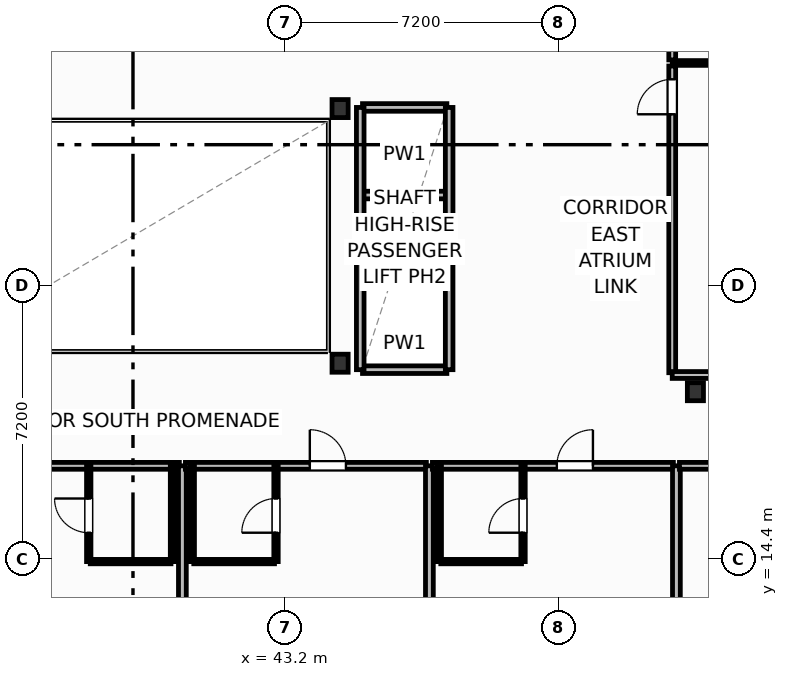
"""IFC4 building model, lengths in metres.
Left out: names, types, materials, properties, quantities, classifications, styles, units other than length and angle.
Written with IfcOpenShell. Run it as: python <this file> out.ifc"""

import sys

from ifc_helpers import new_model, si_unit, direction, frame, frame_2d, origin, origin_2d, place, context, subcontext, project, spatial, rectangle, i_section, extrude, element, fill, save


model = new_model("IFC4")
c1 = context("Model", 3, precision=1e-05, world=origin(), true_north=direction((0.0, 1.0)))
c2 = subcontext(c1, "Body", "Model", "MODEL_VIEW")
j1 = project(units=[si_unit("LENGTHUNIT", "METRE"), si_unit("PLANEANGLEUNIT", "RADIAN")], contexts=[c1])
p1 = place(None, origin())
s1 = spatial("IfcSite", under=j1, at=p1, CompositionType="ELEMENT")
p2 = place(p1, origin())
s2 = spatial("IfcBuilding", under=s1, at=p2, CompositionType="ELEMENT")
p3 = place(p2, frame((0.0, 0.0, 125.4)))
s3 = spatial("IfcBuildingStorey", under=s2, at=p3, CompositionType="ELEMENT", Elevation=125.4)
for number, where, z_axis, x_axis in (
    (1, (44.65, 19.55, 0.0), (0.0, 0.0, 1.0), (1.0, 0.0, 0.0)),
    (2, (44.65, 26.25, 0.0), (0.0, 0.0, 1.0), (1.0, 0.0, 0.0)),
    (3, (54.0, 18.8, 0.0), (0.0, 0.0, 1.0), (1.0, 0.0, 0.0)),
):
    element("IfcColumn", number, at=place(p3, frame(where, z_axis=z_axis, x_axis=x_axis)), inside=s3, PredefinedType="COLUMN", context=c2, shape_type="SweptSolid", body=[
        extrude(i_section(OverallWidth=0.424, OverallDepth=0.474, WebThickness=0.048, FlangeThickness=0.077, FilletRadius=0.025, at=origin_2d()), origin(), (0.0, 0.0, 1.0), 3.7),
    ])
p4 = place(p3, frame((34.08, 16.85, 0.0), z_axis=(0.0, 0.0, 1.0), x_axis=(1.0, 0.0, 0.0)))
e4 = element("IfcWall", 4, at=p4, inside=s3, PredefinedType="PARTITIONING", context=c2, shape_type="SweptSolid", body=[
    extrude(rectangle(XDim=6.34, YDim=0.18, at=frame_2d((3.17, 0.0))), origin(), (0.0, 0.0, 1.0), 3.45),
])
p5 = place(p4, frame((0.91, 0.0, 0.0)))
e5 = element("IfcOpeningElement", 5, at=p5, cuts=e4, PredefinedType="OPENING", context=c2, shape_type="SweptSolid", body=[
    extrude(rectangle(XDim=0.95, YDim=2.15, at=frame_2d((0.475, 1.075))), frame((0.0, 0.1, 0.0), z_axis=(0.0, -1.0, 0.0), x_axis=(1.0, 0.0, 0.0)), (0.0, 0.0, 1.0), 0.2),
])
p6 = place(p3, frame((38.076, 14.33, 0.0), z_axis=(0.0, 0.0, 1.0), x_axis=(1.0, 0.0, 0.0)))
e6 = element("IfcWall", 6, at=p6, inside=s3, PredefinedType="PARTITIONING", context=c2, shape_type="SweptSolid", body=[
    extrude(rectangle(XDim=2.124, YDim=0.115, at=frame_2d((1.062, 0.0))), origin(), (0.0, 0.0, 1.0), 3.45),
])
p7 = place(p3, frame((38.036, 14.33, 0.0), z_axis=(0.0, 0.0, 1.0), x_axis=(0.0, 1.0, 0.0)))
e7 = element("IfcWall", 7, at=p7, inside=s3, PredefinedType="PARTITIONING", context=c2, shape_type="SweptSolid", body=[
    extrude(rectangle(XDim=2.52, YDim=0.115, at=frame_2d((1.26, 0.0))), origin(), (0.0, 0.0, 1.0), 3.45),
])
p8 = place(p7, frame((0.76, 0.0, 0.0)))
e8 = element("IfcOpeningElement", 8, at=p8, cuts=e7, PredefinedType="OPENING", context=c2, shape_type="SweptSolid", body=[
    extrude(rectangle(XDim=0.9, YDim=2.05, at=frame_2d((0.45, 1.025))), frame((0.0, 0.067, 0.0), z_axis=(0.0, -1.0, 0.0), x_axis=(1.0, 0.0, 0.0)), (0.0, 0.0, 1.0), 0.135),
])
p9 = place(p3, frame((40.24, 14.33, 0.0), z_axis=(0.0, 0.0, 1.0), x_axis=(0.0, 1.0, 0.0)))
e9 = element("IfcWall", 9, at=p9, inside=s3, PredefinedType="PARTITIONING", context=c2, shape_type="SweptSolid", body=[
    extrude(rectangle(XDim=2.52, YDim=0.115, at=frame_2d((1.26, 0.0))), origin(), (0.0, 0.0, 1.0), 3.45),
])
p10 = place(p3, frame((40.5, 3.077, 0.0), z_axis=(0.0, 0.0, 1.0), x_axis=(0.0, 1.0, 0.0)))
e10 = element("IfcWall", 10, at=p10, inside=s3, PredefinedType="PARTITIONING", context=c2, shape_type="SweptSolid", body=[
    extrude(rectangle(XDim=13.773, YDim=0.205, at=frame_2d((6.887, 0.0))), origin(), (0.0, 0.0, 1.0), 3.45),
])
p11 = place(p3, frame((40.58, 16.85, 0.0), z_axis=(0.0, 0.0, 1.0), x_axis=(1.0, 0.0, 0.0)))
e11 = element("IfcWall", 11, at=p11, inside=s3, PredefinedType="PARTITIONING", context=c2, shape_type="SweptSolid", body=[
    extrude(rectangle(XDim=6.34, YDim=0.18, at=frame_2d((3.17, 0.0))), origin(), (0.0, 0.0, 1.0), 3.45),
])
p12 = place(p11, frame((3.274, 0.0, 0.0)))
e12 = element("IfcOpeningElement", 12, at=p12, cuts=e11, PredefinedType="OPENING", context=c2, shape_type="SweptSolid", body=[
    extrude(rectangle(XDim=0.95, YDim=2.15, at=frame_2d((0.475, 1.075))), frame((0.0, 0.1, 0.0), z_axis=(0.0, -1.0, 0.0), x_axis=(1.0, 0.0, 0.0)), (0.0, 0.0, 1.0), 0.2),
])
p13 = place(p3, frame((40.8, 14.33, 0.0), z_axis=(0.0, 0.0, 1.0), x_axis=(1.0, 0.0, 0.0)))
e13 = element("IfcWall", 13, at=p13, inside=s3, PredefinedType="PARTITIONING", context=c2, shape_type="SweptSolid", body=[
    extrude(rectangle(XDim=2.124, YDim=0.115, at=frame_2d((1.062, 0.0))), origin(), (0.0, 0.0, 1.0), 3.45),
])
p14 = place(p3, frame((42.964, 14.33, 0.0), z_axis=(0.0, 0.0, 1.0), x_axis=(0.0, 1.0, 0.0)))
e14 = element("IfcWall", 14, at=p14, inside=s3, PredefinedType="PARTITIONING", context=c2, shape_type="SweptSolid", body=[
    extrude(rectangle(XDim=2.52, YDim=0.115, at=frame_2d((1.26, 0.0))), origin(), (0.0, 0.0, 1.0), 3.45),
])
p15 = place(p14, frame((0.76, 0.0, 0.0)))
e15 = element("IfcOpeningElement", 15, at=p15, cuts=e14, PredefinedType="OPENING", context=c2, shape_type="SweptSolid", body=[
    extrude(rectangle(XDim=0.9, YDim=2.05, at=frame_2d((0.45, 1.025))), frame((0.0, 0.067, 0.0), z_axis=(0.0, -1.0, 0.0), x_axis=(1.0, 0.0, 0.0)), (0.0, 0.0, 1.0), 0.135),
])
p16 = place(p3, frame((40.76, 14.33, 0.0), z_axis=(0.0, 0.0, 1.0), x_axis=(0.0, 1.0, 0.0)))
e16 = element("IfcWall", 16, at=p16, inside=s3, PredefinedType="PARTITIONING", context=c2, shape_type="SweptSolid", body=[
    extrude(rectangle(XDim=2.52, YDim=0.115, at=frame_2d((1.26, 0.0))), origin(), (0.0, 0.0, 1.0), 3.45),
])
p17 = place(p3, frame((47.0, 3.019, 0.0), z_axis=(0.0, 0.0, 1.0), x_axis=(0.0, 1.0, 0.0)))
e17 = element("IfcWall", 17, at=p17, inside=s3, PredefinedType="PARTITIONING", context=c2, shape_type="SweptSolid", body=[
    extrude(rectangle(XDim=13.831, YDim=0.205, at=frame_2d((6.916, 0.0))), origin(), (0.0, 0.0, 1.0), 3.45),
])
p18 = place(p3, frame((47.08, 16.85, 0.0), z_axis=(0.0, 0.0, 1.0), x_axis=(1.0, 0.0, 0.0)))
e18 = element("IfcWall", 18, at=p18, inside=s3, PredefinedType="PARTITIONING", context=c2, shape_type="SweptSolid", body=[
    extrude(rectangle(XDim=6.34, YDim=0.18, at=frame_2d((3.17, 0.0))), origin(), (0.0, 0.0, 1.0), 3.45),
])
p19 = place(p18, frame((3.274, 0.0, 0.0)))
e19 = element("IfcOpeningElement", 19, at=p19, cuts=e18, PredefinedType="OPENING", context=c2, shape_type="SweptSolid", body=[
    extrude(rectangle(XDim=0.95, YDim=2.15, at=frame_2d((0.475, 1.075))), frame((0.0, 0.1, 0.0), z_axis=(0.0, -1.0, 0.0), x_axis=(1.0, 0.0, 0.0)), (0.0, 0.0, 1.0), 0.2),
])
p20 = place(p3, frame((47.3, 14.33, 0.0), z_axis=(0.0, 0.0, 1.0), x_axis=(1.0, 0.0, 0.0)))
e20 = element("IfcWall", 20, at=p20, inside=s3, PredefinedType="PARTITIONING", context=c2, shape_type="SweptSolid", body=[
    extrude(rectangle(XDim=2.124, YDim=0.115, at=frame_2d((1.062, 0.0))), origin(), (0.0, 0.0, 1.0), 3.45),
])
p21 = place(p3, frame((49.464, 14.33, 0.0), z_axis=(0.0, 0.0, 1.0), x_axis=(0.0, 1.0, 0.0)))
e21 = element("IfcWall", 21, at=p21, inside=s3, PredefinedType="PARTITIONING", context=c2, shape_type="SweptSolid", body=[
    extrude(rectangle(XDim=2.52, YDim=0.115, at=frame_2d((1.26, 0.0))), origin(), (0.0, 0.0, 1.0), 3.45),
])
p22 = place(p21, frame((0.76, 0.0, 0.0)))
e22 = element("IfcOpeningElement", 22, at=p22, cuts=e21, PredefinedType="OPENING", context=c2, shape_type="SweptSolid", body=[
    extrude(rectangle(XDim=0.9, YDim=2.05, at=frame_2d((0.45, 1.025))), frame((0.0, 0.067, 0.0), z_axis=(0.0, -1.0, 0.0), x_axis=(1.0, 0.0, 0.0)), (0.0, 0.0, 1.0), 0.135),
])
p23 = place(p3, frame((47.26, 14.33, 0.0), z_axis=(0.0, 0.0, 1.0), x_axis=(0.0, 1.0, 0.0)))
e23 = element("IfcWall", 23, at=p23, inside=s3, PredefinedType="PARTITIONING", context=c2, shape_type="SweptSolid", body=[
    extrude(rectangle(XDim=2.52, YDim=0.115, at=frame_2d((1.26, 0.0))), origin(), (0.0, 0.0, 1.0), 3.45),
])
p24 = place(p3, frame((53.5, 0.136, 0.0), z_axis=(0.0, 0.0, 1.0), x_axis=(0.0, 1.0, 0.0)))
e24 = element("IfcWall", 24, at=p24, inside=s3, PredefinedType="PARTITIONING", context=c2, shape_type="SweptSolid", body=[
    extrude(rectangle(XDim=16.714, YDim=0.205, at=frame_2d((8.357, 0.0))), origin(), (0.0, 0.0, 1.0), 3.45),
])
p25 = place(p3, frame((53.58, 16.85, 0.0), z_axis=(0.0, 0.0, 1.0), x_axis=(1.0, 0.0, 0.0)))
e25 = element("IfcWall", 25, at=p25, inside=s3, PredefinedType="PARTITIONING", context=c2, shape_type="SweptSolid", body=[
    extrude(rectangle(XDim=6.34, YDim=0.18, at=frame_2d((3.17, 0.0))), origin(), (0.0, 0.0, 1.0), 3.45),
])
p26 = place(p25, frame((0.91, 0.0, 0.0)))
e26 = element("IfcOpeningElement", 26, at=p26, cuts=e25, PredefinedType="OPENING", context=c2, shape_type="SweptSolid", body=[
    extrude(rectangle(XDim=0.95, YDim=2.15, at=frame_2d((0.475, 1.075))), frame((0.0, 0.1, 0.0), z_axis=(0.0, -1.0, 0.0), x_axis=(1.0, 0.0, 0.0)), (0.0, 0.0, 1.0), 0.2),
])
p27 = place(p3, frame((53.39, 19.3, 0.0), z_axis=(0.0, 0.0, 1.0), x_axis=(0.0, 1.0, 0.0)))
e27 = element("IfcWall", 27, at=p27, inside=s3, PredefinedType="PARTITIONING", context=c2, shape_type="SweptSolid", body=[
    extrude(rectangle(XDim=8.07, YDim=0.18, at=frame_2d((4.035, 0.0))), origin(), (0.0, 0.0, 1.0), 3.45),
])
p28 = place(p27, frame((6.8, 0.0, 0.0)))
e28 = element("IfcOpeningElement", 28, at=p28, cuts=e27, PredefinedType="OPENING", context=c2, shape_type="SweptSolid", body=[
    extrude(rectangle(XDim=0.92, YDim=2.05, at=frame_2d((0.46, 1.025))), frame((0.0, 0.1, 0.0), z_axis=(0.0, -1.0, 0.0), x_axis=(1.0, 0.0, 0.0)), (0.0, 0.0, 1.0), 0.2),
])
p29 = place(p3, frame((53.39, 27.53, 0.0), z_axis=(0.0, 0.0, 1.0), x_axis=(0.0, 1.0, 0.0)))
e29 = element("IfcWall", 29, at=p29, inside=s3, PredefinedType="PARTITIONING", context=c2, shape_type="SweptSolid", body=[
    extrude(rectangle(XDim=11.67, YDim=0.18, at=frame_2d((5.835, 0.0))), origin(), (0.0, 0.0, 1.0), 3.45),
])
p30 = place(p29, frame((5.8, 0.0, 0.0)))
e30 = element("IfcOpeningElement", 30, at=p30, cuts=e29, PredefinedType="OPENING", context=c2, shape_type="SweptSolid", body=[
    extrude(rectangle(XDim=0.92, YDim=2.05, at=frame_2d((0.46, 1.025))), frame((0.0, 0.1, 0.0), z_axis=(0.0, -1.0, 0.0), x_axis=(1.0, 0.0, 0.0)), (0.0, 0.0, 1.0), 0.2),
])
p31 = place(p3, frame((53.39, 27.45, 0.0), z_axis=(0.0, 0.0, 1.0), x_axis=(1.0, 0.0, 0.0)))
e31 = element("IfcWall", 31, at=p31, inside=s3, PredefinedType="PARTITIONING", context=c2, shape_type="SweptSolid", body=[
    extrude(rectangle(XDim=23.362, YDim=0.125, at=frame_2d((11.681, 0.0))), origin(), (0.0, 0.0, 1.0), 3.45),
])
p32 = place(p3, frame((53.39, 19.24, 0.0), z_axis=(0.0, 0.0, 1.0), x_axis=(1.0, 0.0, 0.0)))
e32 = element("IfcWall", 32, at=p32, inside=s3, PredefinedType="PARTITIONING", context=c2, shape_type="SweptSolid", body=[
    extrude(rectangle(XDim=22.367, YDim=0.18, at=frame_2d((11.183, 0.0))), origin(), (0.0, 0.0, 1.0), 2.662),
])
for number, where, z_axis, x_axis in (
    (33, (45.24, 21.675, 0.0), (0.0, 0.0, 1.0), (1.0, 0.0, 0.0)),
    (34, (45.24, 23.975, 0.0), (0.0, 0.0, 1.0), (1.0, 0.0, 0.0)),
):
    element("IfcWall", number, at=place(p3, frame(where, z_axis=z_axis, x_axis=x_axis)), inside=s3, PredefinedType="PARTITIONING", context=c2, shape_type="SweptSolid", body=[
        extrude(rectangle(XDim=2.22, YDim=0.2, at=frame_2d((1.11, 0.0))), origin(), (0.0, 0.0, 1.0), 3.45),
    ])
p33 = place(p3, frame((45.24, 19.38, 0.0), z_axis=(0.0, 0.0, 1.0), x_axis=(1.0, 0.0, 0.0)))
e35 = element("IfcWall", 35, at=p33, inside=s3, PredefinedType="PARTITIONING", context=c2, shape_type="SweptSolid", body=[
    extrude(rectangle(XDim=2.22, YDim=0.2, at=frame_2d((1.11, 0.0))), origin(), (0.0, 0.0, 1.0), 2.662),
])
p34 = place(p3, frame((45.24, 26.28, 0.0), z_axis=(0.0, 0.0, 1.0), x_axis=(1.0, 0.0, 0.0)))
e36 = element("IfcWall", 36, at=p34, inside=s3, PredefinedType="PARTITIONING", context=c2, shape_type="SweptSolid", body=[
    extrude(rectangle(XDim=2.22, YDim=0.2, at=frame_2d((1.11, 0.0))), origin(), (0.0, 0.0, 1.0), 3.45),
])
for number, where, z_axis, x_axis in (
    (37, (45.18, 19.38, 0.0), (0.0, 0.0, 1.0), (0.0, 1.0, 0.0)),
    (38, (47.52, 19.38, 0.0), (0.0, 0.0, 1.0), (0.0, 1.0, 0.0)),
):
    element("IfcWall", number, at=place(p3, frame(where, z_axis=z_axis, x_axis=x_axis)), inside=s3, PredefinedType="PARTITIONING", context=c2, shape_type="SweptSolid", body=[
        extrude(rectangle(XDim=6.9, YDim=0.2, at=frame_2d((3.45, 0.0))), origin(), (0.0, 0.0, 1.0), 3.45),
    ])
p35 = place(p8, origin())
e39 = element("IfcDoor", 39, at=p35, inside=s3, OperationType="SINGLE_SWING_RIGHT", PredefinedType="DOOR", context=c2, shape_type="SweptSolid", body=[
    extrude(rectangle(XDim=0.9, YDim=2.05, at=frame_2d((0.45, 1.025))), frame((0.0, 0.025, 0.0), z_axis=(0.0, -1.0, 0.0), x_axis=(1.0, 0.0, 0.0)), (0.0, 0.0, 1.0), 0.05),
])
fill(e8, e39)
p36 = place(p12, origin())
e40 = element("IfcDoor", 40, at=p36, inside=s3, OperationType="SINGLE_SWING_LEFT", PredefinedType="DOOR", context=c2, shape_type="SweptSolid", body=[
    extrude(rectangle(XDim=0.95, YDim=2.15, at=frame_2d((0.475, 1.075))), frame((0.0, 0.025, 0.0), z_axis=(0.0, -1.0, 0.0), x_axis=(1.0, 0.0, 0.0)), (0.0, 0.0, 1.0), 0.05),
])
fill(e12, e40)
p37 = place(p15, origin())
e41 = element("IfcDoor", 41, at=p37, inside=s3, OperationType="SINGLE_SWING_LEFT", PredefinedType="DOOR", context=c2, shape_type="SweptSolid", body=[
    extrude(rectangle(XDim=0.9, YDim=2.05, at=frame_2d((0.45, 1.025))), frame((0.0, 0.025, 0.0), z_axis=(0.0, -1.0, 0.0), x_axis=(1.0, 0.0, 0.0)), (0.0, 0.0, 1.0), 0.05),
])
fill(e15, e41)
p38 = place(p19, origin())
e42 = element("IfcDoor", 42, at=p38, inside=s3, OperationType="SINGLE_SWING_RIGHT", PredefinedType="DOOR", context=c2, shape_type="SweptSolid", body=[
    extrude(rectangle(XDim=0.95, YDim=2.15, at=frame_2d((0.475, 1.075))), frame((0.0, 0.025, 0.0), z_axis=(0.0, -1.0, 0.0), x_axis=(1.0, 0.0, 0.0)), (0.0, 0.0, 1.0), 0.05),
])
fill(e19, e42)
p39 = place(p22, origin())
e43 = element("IfcDoor", 43, at=p39, inside=s3, OperationType="SINGLE_SWING_LEFT", PredefinedType="DOOR", context=c2, shape_type="SweptSolid", body=[
    extrude(rectangle(XDim=0.9, YDim=2.05, at=frame_2d((0.45, 1.025))), frame((0.0, 0.025, 0.0), z_axis=(0.0, -1.0, 0.0), x_axis=(1.0, 0.0, 0.0)), (0.0, 0.0, 1.0), 0.05),
])
fill(e22, e43)
p40 = place(p28, origin())
e44 = element("IfcDoor", 44, at=p40, inside=s3, OperationType="SINGLE_SWING_LEFT", PredefinedType="DOOR", context=c2, shape_type="SweptSolid", body=[
    extrude(rectangle(XDim=0.92, YDim=2.05, at=frame_2d((0.46, 1.025))), frame((0.0, 0.025, 0.0), z_axis=(0.0, -1.0, 0.0), x_axis=(1.0, 0.0, 0.0)), (0.0, 0.0, 1.0), 0.05),
])
fill(e28, e44)
save(model, sys.argv[1])
